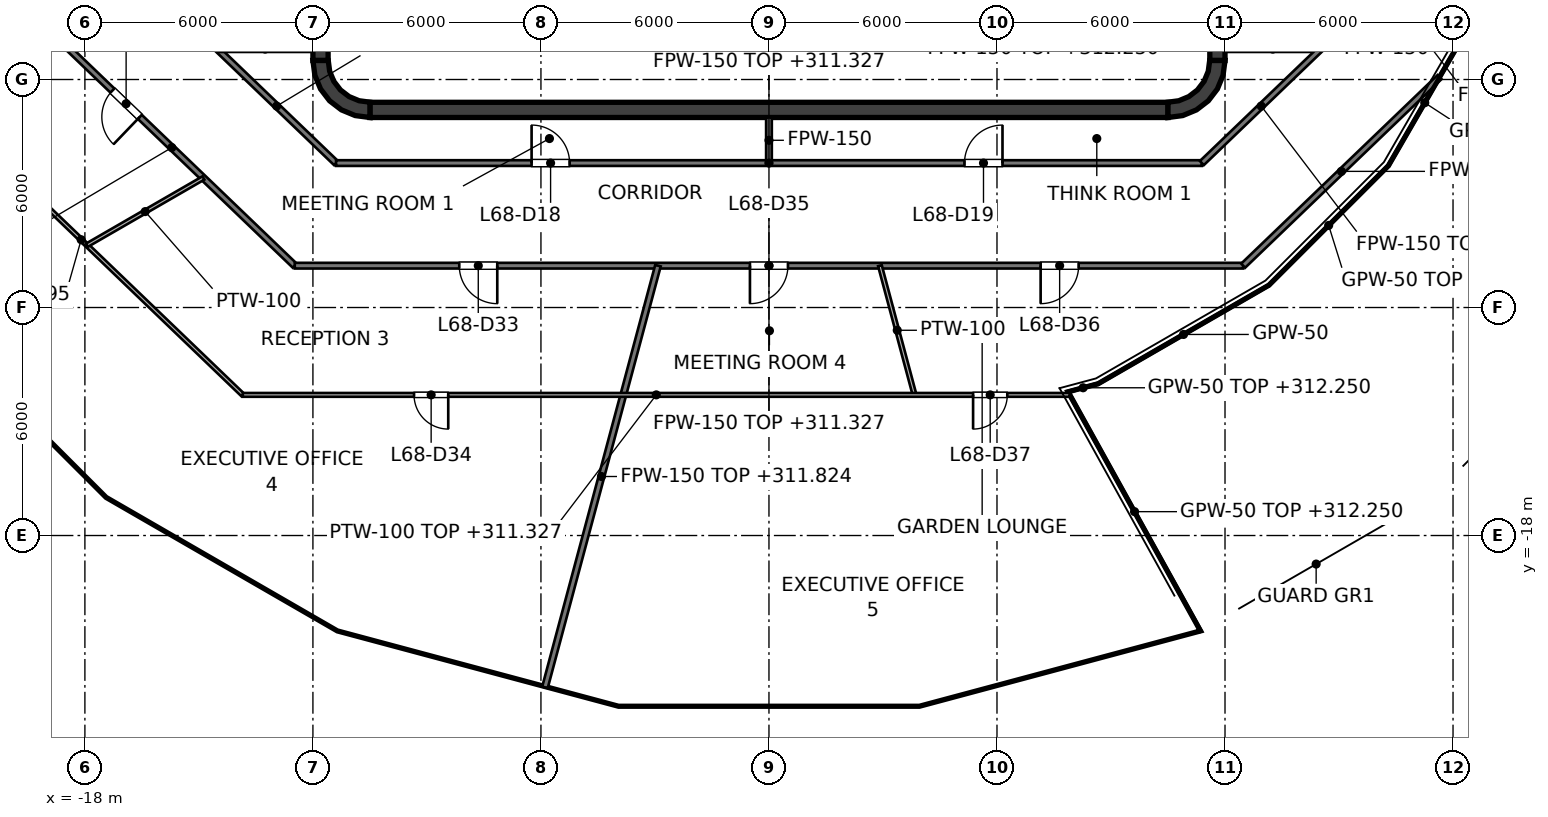
"""IFC4 building model, lengths in metres.
Left out: names, types, materials, properties, quantities, classifications, styles, units other than length and angle.
Written with IfcOpenShell. Run it as: python <this file> out.ifc"""

import sys

from ifc_helpers import new_model, si_unit, direction, frame, frame_2d, origin, place, context, subcontext, project, spatial, polyline, rectangle, outline, extrude, element, fill, save


model = new_model("IFC4")
c1 = context("Model", 3, precision=1e-05, world=origin(), true_north=direction((0.0, 1.0)))
c2 = subcontext(c1, "Body", "Model", "MODEL_VIEW")
j1 = project(units=[si_unit("LENGTHUNIT", "METRE"), si_unit("PLANEANGLEUNIT", "RADIAN")], contexts=[c1])
p1 = place(None, origin())
s1 = spatial("IfcSite", under=j1, at=p1, CompositionType="ELEMENT")
p2 = place(p1, origin())
s2 = spatial("IfcBuilding", under=s1, at=p2, CompositionType="ELEMENT")
p3 = place(p2, frame((0.0, 0.0, 308.4)))
s3 = spatial("IfcBuildingStorey", under=s2, at=p3, CompositionType="ELEMENT", Elevation=308.4)
p4 = place(p3, frame((-10.5, -6.8, 0.0), z_axis=(0.0, 0.0, 1.0), x_axis=(1.0, 0.0, 0.0)))
e1 = element("IfcWall", 1, at=p4, inside=s3, PredefinedType="SHEAR", context=c2, shape_type="SweptSolid", body=[
    extrude(rectangle(XDim=21.0, YDim=0.4, at=frame_2d((10.5, 0.0))), origin(), (0.0, 0.0, 1.0), 4.0),
])
p5 = place(p3, frame((11.8, -5.5, 0.0), z_axis=(0.0, 0.0, 1.0), x_axis=(0.0, 1.0, 0.0)))
e2 = element("IfcWall", 2, at=p5, inside=s3, PredefinedType="SHEAR", context=c2, shape_type="SweptSolid", body=[
    extrude(rectangle(XDim=11.0, YDim=0.4, at=frame_2d((5.5, 0.0))), origin(), (0.0, 0.0, 1.0), 4.0),
])
p6 = place(p5, frame((3.2, 0.0, 0.0)))
e3 = element("IfcOpeningElement", 3, at=p6, cuts=e2, PredefinedType="OPENING", context=c2, shape_type="SweptSolid", body=[
    extrude(rectangle(XDim=1.0, YDim=2.1, at=frame_2d((0.5, 1.05))), frame((0.0, 0.2, 0.0), z_axis=(0.0, -1.0, 0.0), x_axis=(1.0, 0.0, 0.0)), (0.0, 0.0, 1.0), 0.4),
])
p7 = place(p5, frame((6.1, 0.0, 0.0)))
e4 = element("IfcOpeningElement", 4, at=p7, cuts=e2, PredefinedType="OPENING", context=c2, shape_type="SweptSolid", body=[
    extrude(rectangle(XDim=1.0, YDim=2.1, at=frame_2d((0.5, 1.05))), frame((0.0, 0.2, 0.0), z_axis=(0.0, -1.0, 0.0), x_axis=(1.0, 0.0, 0.0)), (0.0, 0.0, 1.0), 0.4),
])
p8 = place(p5, frame((0.9, 0.0, 0.0)))
e5 = element("IfcOpeningElement", 5, at=p8, cuts=e2, PredefinedType="OPENING", context=c2, shape_type="SweptSolid", body=[
    extrude(rectangle(XDim=1.2, YDim=2.1, at=frame_2d((0.6, 1.05))), frame((0.0, 0.2, 0.0), z_axis=(0.0, -1.0, 0.0), x_axis=(1.0, 0.0, 0.0)), (0.0, 0.0, 1.0), 0.4),
])
p9 = place(p5, frame((8.9, 0.0, 0.0)))
e6 = element("IfcOpeningElement", 6, at=p9, cuts=e2, PredefinedType="OPENING", context=c2, shape_type="SweptSolid", body=[
    extrude(rectangle(XDim=1.2, YDim=2.1, at=frame_2d((0.6, 1.05))), frame((0.0, 0.2, 0.0), z_axis=(0.0, -1.0, 0.0), x_axis=(1.0, 0.0, 0.0)), (0.0, 0.0, 1.0), 0.4),
])
p10 = place(p3, frame((-11.8, -5.5, 0.0), z_axis=(0.0, 0.0, 1.0), x_axis=(0.0, 1.0, 0.0)))
e7 = element("IfcWall", 7, at=p10, inside=s3, PredefinedType="SHEAR", context=c2, shape_type="SweptSolid", body=[
    extrude(rectangle(XDim=11.0, YDim=0.4, at=frame_2d((5.5, 0.0))), origin(), (0.0, 0.0, 1.0), 4.0),
])
p11 = place(p10, frame((3.8, 0.0, 0.0)))
e8 = element("IfcOpeningElement", 8, at=p11, cuts=e7, PredefinedType="OPENING", context=c2, shape_type="SweptSolid", body=[
    extrude(rectangle(XDim=1.0, YDim=2.1, at=frame_2d((0.5, 1.05))), frame((0.0, 0.2, 0.0), z_axis=(0.0, -1.0, 0.0), x_axis=(1.0, 0.0, 0.0)), (0.0, 0.0, 1.0), 0.4),
])
p12 = place(p10, frame((6.7, 0.0, 0.0)))
e9 = element("IfcOpeningElement", 9, at=p12, cuts=e7, PredefinedType="OPENING", context=c2, shape_type="SweptSolid", body=[
    extrude(rectangle(XDim=1.0, YDim=2.1, at=frame_2d((0.5, 1.05))), frame((0.0, 0.2, 0.0), z_axis=(0.0, -1.0, 0.0), x_axis=(1.0, 0.0, 0.0)), (0.0, 0.0, 1.0), 0.4),
])
p13 = place(p10, frame((0.9, 0.0, 0.0)))
e10 = element("IfcOpeningElement", 10, at=p13, cuts=e7, PredefinedType="OPENING", context=c2, shape_type="SweptSolid", body=[
    extrude(rectangle(XDim=1.2, YDim=2.1, at=frame_2d((0.6, 1.05))), frame((0.0, 0.2, 0.0), z_axis=(0.0, -1.0, 0.0), x_axis=(1.0, 0.0, 0.0)), (0.0, 0.0, 1.0), 0.4),
])
p14 = place(p10, frame((8.9, 0.0, 0.0)))
e11 = element("IfcOpeningElement", 11, at=p14, cuts=e7, PredefinedType="OPENING", context=c2, shape_type="SweptSolid", body=[
    extrude(rectangle(XDim=1.2, YDim=2.1, at=frame_2d((0.6, 1.05))), frame((0.0, 0.2, 0.0), z_axis=(0.0, -1.0, 0.0), x_axis=(1.0, 0.0, 0.0)), (0.0, 0.0, 1.0), 0.4),
])
p15 = place(p3, origin())
e12 = element("IfcWall", 12, at=p15, inside=s3, PredefinedType="SHEAR", context=c2, shape_type="SweptSolid", body=[
    extrude(outline(polyline([(-10.5, -7.0), (-10.5, -6.596), (-10.784, -6.559), (-11.048, -6.45), (-11.275, -6.275), (-11.45, -6.048), (-11.559, -5.784), (-11.596, -5.5), (-12.0, -5.5), (-11.949, -5.888), (-11.799, -6.25), (-11.561, -6.561), (-11.25, -6.799), (-10.888, -6.949), (-10.5, -7.0)])), origin(), (0.0, 0.0, 1.0), 4.0),
])
e13 = element("IfcWall", 13, at=p15, inside=s3, PredefinedType="SHEAR", context=c2, shape_type="SweptSolid", body=[
    extrude(outline(polyline([(12.0, -5.5), (11.596, -5.5), (11.559, -5.784), (11.45, -6.048), (11.275, -6.275), (11.048, -6.45), (10.784, -6.559), (10.5, -6.596), (10.5, -7.0), (10.888, -6.949), (11.25, -6.799), (11.561, -6.561), (11.799, -6.25), (11.949, -5.888), (12.0, -5.5)])), origin(), (0.0, 0.0, 1.0), 4.0),
])
p16 = place(p3, frame((-1.2, -6.6, 0.0), z_axis=(0.0, 0.0, 1.0), x_axis=(0.0, 1.0, 0.0)))
e14 = element("IfcWall", 14, at=p16, inside=s3, PredefinedType="PARTITIONING", context=c2, shape_type="SweptSolid", body=[
    extrude(rectangle(XDim=2.5, YDim=0.15, at=frame_2d((1.25, 0.0))), origin(), (0.0, 0.0, 1.0), 3.85),
])
p17 = place(p16, frame((0.8, 0.0, 0.0)))
e15 = element("IfcOpeningElement", 15, at=p17, cuts=e14, PredefinedType="OPENING", context=c2, shape_type="SweptSolid", body=[
    extrude(rectangle(XDim=0.9, YDim=2.1, at=frame_2d((0.45, 1.05))), frame((0.0, 0.075, 0.0), z_axis=(0.0, -1.0, 0.0), x_axis=(1.0, 0.0, 0.0)), (0.0, 0.0, 1.0), 0.15),
])
p18 = place(p3, frame((9.0, -6.6, 0.0), z_axis=(0.0, 0.0, 1.0), x_axis=(0.0, 1.0, 0.0)))
e16 = element("IfcWall", 16, at=p18, inside=s3, PredefinedType="SOLIDWALL", context=c2, shape_type="SweptSolid", body=[
    extrude(rectangle(XDim=2.5, YDim=0.25, at=frame_2d((1.25, 0.0))), origin(), (0.0, 0.0, 1.0), 3.85),
])
p19 = place(p18, frame((0.65, 0.0, 0.0)))
e17 = element("IfcOpeningElement", 17, at=p19, cuts=e16, PredefinedType="OPENING", context=c2, shape_type="SweptSolid", body=[
    extrude(rectangle(XDim=1.2, YDim=2.1, at=frame_2d((0.6, 1.05))), frame((0.0, 0.125, 0.0), z_axis=(0.0, -1.0, 0.0), x_axis=(1.0, 0.0, 0.0)), (0.0, 0.0, 1.0), 0.25),
])
p20 = place(p3, frame((-9.0, -6.6, 0.0), z_axis=(0.0, 0.0, 1.0), x_axis=(0.0, 1.0, 0.0)))
e18 = element("IfcWall", 18, at=p20, inside=s3, PredefinedType="PARTITIONING", context=c2, shape_type="SweptSolid", body=[
    extrude(rectangle(XDim=2.5, YDim=0.25, at=frame_2d((1.25, 0.0))), origin(), (0.0, 0.0, 1.0), 3.85),
])
p21 = place(p20, frame((0.75, 0.0, 0.0)))
e19 = element("IfcOpeningElement", 19, at=p21, cuts=e18, PredefinedType="OPENING", context=c2, shape_type="SweptSolid", body=[
    extrude(rectangle(XDim=1.0, YDim=2.1, at=frame_2d((0.5, 1.05))), frame((0.0, 0.125, 0.0), z_axis=(0.0, -1.0, 0.0), x_axis=(1.0, 0.0, 0.0)), (0.0, 0.0, 1.0), 0.25),
])
p22 = place(p3, frame((3.15, -6.6, 0.0), z_axis=(0.0, 0.0, 1.0), x_axis=(0.0, 1.0, 0.0)))
e20 = element("IfcWall", 20, at=p22, inside=s3, PredefinedType="SOLIDWALL", context=c2, shape_type="SweptSolid", body=[
    extrude(rectangle(XDim=2.5, YDim=0.25, at=frame_2d((1.25, 0.0))), origin(), (0.0, 0.0, 1.0), 3.85),
])
p23 = place(p3, frame((-2.9, -6.6, 0.0), z_axis=(0.0, 0.0, 1.0), x_axis=(0.0, 1.0, 0.0)))
e21 = element("IfcWall", 21, at=p23, inside=s3, PredefinedType="PARTITIONING", context=c2, shape_type="SweptSolid", body=[
    extrude(rectangle(XDim=2.5, YDim=0.25, at=frame_2d((1.25, 0.0))), origin(), (0.0, 0.0, 1.0), 3.85),
])
p24 = place(p23, frame((0.8, 0.0, 0.0)))
e22 = element("IfcOpeningElement", 22, at=p24, cuts=e21, PredefinedType="OPENING", context=c2, shape_type="SweptSolid", body=[
    extrude(rectangle(XDim=0.9, YDim=2.1, at=frame_2d((0.45, 1.05))), frame((0.0, 0.125, 0.0), z_axis=(0.0, -1.0, 0.0), x_axis=(1.0, 0.0, 0.0)), (0.0, 0.0, 1.0), 0.25),
])
p25 = place(p3, frame((-18.95, -4.683, 0.0), z_axis=(0.0, 0.0, 1.0), x_axis=(0.721259541977, -0.692664906797, 0.0)))
e23 = element("IfcWall", 23, at=p25, inside=s3, PredefinedType="PARTITIONING", context=c2, shape_type="SweptSolid", body=[
    extrude(rectangle(XDim=8.973, YDim=0.15, at=frame_2d((4.487, 0.0))), origin(), (0.0, 0.0, 1.0), 3.076),
])
p26 = place(p25, frame((2.321, 0.0, 0.0)))
e24 = element("IfcOpeningElement", 24, at=p26, cuts=e23, PredefinedType="OPENING", context=c2, shape_type="SweptSolid", body=[
    extrude(rectangle(XDim=1.0, YDim=2.1, at=frame_2d((0.5, 1.05))), frame((0.0, 0.075, 0.0), z_axis=(0.0, -1.0, 0.0), x_axis=(1.0, 0.0, 0.0)), (0.0, 0.0, 1.0), 0.15),
])
p27 = place(p3, frame((-14.514, -5.2, 0.0), z_axis=(0.0, 0.0, 1.0), x_axis=(0.721228427004, -0.692697304803, 0.0)))
e25 = element("IfcWall", 25, at=p27, inside=s3, PredefinedType="PARTITIONING", context=c2, shape_type="SweptSolid", body=[
    extrude(rectangle(XDim=4.33, YDim=0.15, at=frame_2d((2.165, 0.0))), origin(), (0.0, 0.0, 1.0), 3.076),
])
p28 = place(p3, frame((-12.478, -10.899, 0.0), z_axis=(0.0, 0.0, 1.0), x_axis=(1.0, 0.0, 0.0)))
e26 = element("IfcWall", 26, at=p28, inside=s3, PredefinedType="PARTITIONING", context=c2, shape_type="SweptSolid", body=[
    extrude(rectangle(XDim=24.956, YDim=0.15, at=frame_2d((12.478, 0.0))), origin(), (0.0, 0.0, 1.0), 2.927),
])
p29 = place(p28, frame((4.329, 0.0, 0.0)))
e27 = element("IfcOpeningElement", 27, at=p29, cuts=e26, PredefinedType="OPENING", context=c2, shape_type="SweptSolid", body=[
    extrude(rectangle(XDim=1.0, YDim=2.1, at=frame_2d((0.5, 1.05))), frame((0.0, 0.075, 0.0), z_axis=(0.0, -1.0, 0.0), x_axis=(1.0, 0.0, 0.0)), (0.0, 0.0, 1.0), 0.15),
])
p30 = place(p28, frame((11.978, 0.0, 0.0)))
e28 = element("IfcOpeningElement", 28, at=p30, cuts=e26, PredefinedType="OPENING", context=c2, shape_type="SweptSolid", body=[
    extrude(rectangle(XDim=1.0, YDim=2.1, at=frame_2d((0.5, 1.05))), frame((0.0, 0.075, 0.0), z_axis=(0.0, -1.0, 0.0), x_axis=(1.0, 0.0, 0.0)), (0.0, 0.0, 1.0), 0.15),
])
p31 = place(p28, frame((19.627, 0.0, 0.0)))
e29 = element("IfcOpeningElement", 29, at=p31, cuts=e26, PredefinedType="OPENING", context=c2, shape_type="SweptSolid", body=[
    extrude(rectangle(XDim=1.0, YDim=2.1, at=frame_2d((0.5, 1.05))), frame((0.0, 0.075, 0.0), z_axis=(0.0, -1.0, 0.0), x_axis=(1.0, 0.0, 0.0)), (0.0, 0.0, 1.0), 0.15),
])
p32 = place(p3, frame((-11.391, -8.199, 0.0), z_axis=(0.0, 0.0, 1.0), x_axis=(1.0, 0.0, 0.0)))
e30 = element("IfcWall", 30, at=p32, inside=s3, PredefinedType="PARTITIONING", context=c2, shape_type="SweptSolid", body=[
    extrude(rectangle(XDim=22.782, YDim=0.15, at=frame_2d((11.391, 0.0))), origin(), (0.0, 0.0, 1.0), 2.927),
])
p33 = place(p32, frame((5.145, 0.0, 0.0)))
e31 = element("IfcOpeningElement", 31, at=p33, cuts=e30, PredefinedType="OPENING", context=c2, shape_type="SweptSolid", body=[
    extrude(rectangle(XDim=1.0, YDim=2.1, at=frame_2d((0.5, 1.05))), frame((0.0, 0.075, 0.0), z_axis=(0.0, -1.0, 0.0), x_axis=(1.0, 0.0, 0.0)), (0.0, 0.0, 1.0), 0.15),
])
p34 = place(p32, frame((16.536, 0.0, 0.0)))
e32 = element("IfcOpeningElement", 32, at=p34, cuts=e30, PredefinedType="OPENING", context=c2, shape_type="SweptSolid", body=[
    extrude(rectangle(XDim=1.0, YDim=2.1, at=frame_2d((0.5, 1.05))), frame((0.0, 0.075, 0.0), z_axis=(0.0, -1.0, 0.0), x_axis=(1.0, 0.0, 0.0)), (0.0, 0.0, 1.0), 0.15),
])
p35 = place(p3, frame((12.478, -10.899, 0.0), z_axis=(0.0, 0.0, 1.0), x_axis=(0.721272918752, 0.692650977531, 0.0)))
e33 = element("IfcWall", 33, at=p35, inside=s3, PredefinedType="PARTITIONING", context=c2, shape_type="SweptSolid", body=[
    extrude(rectangle(XDim=7.165, YDim=0.15, at=frame_2d((3.583, 0.0))), origin(), (0.0, 0.0, 1.0), 3.076),
])
p36 = place(p3, frame((11.391, -8.199, 0.0), z_axis=(0.0, 0.0, 1.0), x_axis=(0.721256597366, 0.692667972954, 0.0)))
e34 = element("IfcWall", 34, at=p36, inside=s3, PredefinedType="PARTITIONING", context=c2, shape_type="SweptSolid", body=[
    extrude(rectangle(XDim=4.33, YDim=0.15, at=frame_2d((2.165, 0.0))), origin(), (0.0, 0.0, 1.0), 3.076),
])
p37 = place(p3, frame((-5.894, -21.995, 0.0), z_axis=(0.0, 0.0, 1.0), x_axis=(0.25881327894, 0.965927371309, 0.0)))
e35 = element("IfcWall", 35, at=p37, inside=s3, PredefinedType="PARTITIONING", context=c2, shape_type="SweptSolid", body=[
    extrude(rectangle(XDim=11.488, YDim=0.15, at=frame_2d((5.744, 0.0))), origin(), (0.0, 0.0, 1.0), 3.424),
])
p38 = place(p3, frame((0.0, -8.199, 0.0), z_axis=(0.0, 0.0, 1.0), x_axis=(0.0, 1.0, 0.0)))
e36 = element("IfcWall", 36, at=p38, inside=s3, PredefinedType="PARTITIONING", context=c2, shape_type="SweptSolid", body=[
    extrude(rectangle(XDim=1.199, YDim=0.15, at=frame_2d((0.6, 0.0))), origin(), (0.0, 0.0, 1.0), 2.995),
])
p39 = place(p3, frame((7.871, -14.218, 0.0), z_axis=(0.0, 0.0, 1.0), x_axis=(0.484932931807, -0.874551343061, 0.0)))
e37 = element("IfcWall", 37, at=p39, inside=s3, PredefinedType="PARTITIONING", context=c2, shape_type="SweptSolid", body=[
    extrude(rectangle(XDim=7.213, YDim=0.05, at=frame_2d((3.606, 0.0))), origin(), (0.0, 0.0, 1.0), 3.85),
])
p40 = place(p3, frame((7.871, -14.218, 0.0), z_axis=(0.0, 0.0, 1.0), x_axis=(0.965937406396, 0.258775823689, 0.0)))
e38 = element("IfcWall", 38, at=p40, inside=s3, PredefinedType="PARTITIONING", context=c2, shape_type="SweptSolid", body=[
    extrude(rectangle(XDim=0.819, YDim=0.05, at=frame_2d((0.409, 0.0))), origin(), (0.0, 0.0, 1.0), 3.85),
])
p41 = place(p3, frame((8.662, -14.006, 0.0), z_axis=(0.0, 0.0, 1.0), x_axis=(0.86602493519, 0.500000811628, 0.0)))
e39 = element("IfcWall", 39, at=p41, inside=s3, PredefinedType="PARTITIONING", context=c2, shape_type="SweptSolid", body=[
    extrude(rectangle(XDim=5.188, YDim=0.05, at=frame_2d((2.594, 0.0))), origin(), (0.0, 0.0, 1.0), 2.995),
])
p42 = place(p3, frame((13.155, -11.412, 0.0), z_axis=(0.0, 0.0, 1.0), x_axis=(0.707106781187, 0.707106781187, 0.0)))
e40 = element("IfcWall", 40, at=p42, inside=s3, PredefinedType="PARTITIONING", context=c2, shape_type="SweptSolid", body=[
    extrude(rectangle(XDim=4.448, YDim=0.05, at=frame_2d((2.224, 0.0))), origin(), (0.0, 0.0, 1.0), 3.076),
])
p43 = place(p3, frame((16.3, -8.267, 0.0), z_axis=(0.0, 0.0, 1.0), x_axis=(0.500019073792, 0.866014391245, 0.0)))
e41 = element("IfcWall", 41, at=p43, inside=s3, PredefinedType="PARTITIONING", context=c2, shape_type="SweptSolid", body=[
    extrude(rectangle(XDim=3.823, YDim=0.05, at=frame_2d((1.912, 0.0))), origin(), (0.0, 0.0, 1.0), 3.076),
])
p44 = place(p3, frame((2.92, -10.899, 0.0), z_axis=(0.0, 0.0, 1.0), x_axis=(0.258836620112, -0.965921116908, 0.0)))
e42 = element("IfcWall", 42, at=p44, inside=s3, PredefinedType="PARTITIONING", context=c2, shape_type="SweptSolid", body=[
    extrude(rectangle(XDim=3.52, YDim=0.1, at=frame_2d((1.76, 0.0))), origin(), (0.0, 0.0, 1.0), 3.85),
])
p45 = place(p3, frame((-22.35, -6.132, 0.0), z_axis=(0.0, 0.0, 1.0), x_axis=(0.72117874289, -0.692749031615, 0.0)))
e43 = element("IfcWall", 43, at=p45, inside=s3, PredefinedType="PARTITIONING", context=c2, shape_type="SweptSolid", body=[
    extrude(rectangle(XDim=11.791, YDim=0.1, at=frame_2d((5.896, 0.0))), origin(), (0.0, 0.0, 1.0), 2.995),
])
p46 = place(p3, frame((-13.846, -14.299, 0.0), z_axis=(0.0, 0.0, 1.0), x_axis=(1.0, 0.0, 0.0)))
e44 = element("IfcWall", 44, at=p46, inside=s3, PredefinedType="PARTITIONING", context=c2, shape_type="SweptSolid", body=[
    extrude(rectangle(XDim=21.762, YDim=0.1, at=frame_2d((10.881, 0.0))), origin(), (0.0, 0.0, 1.0), 2.927),
])
p47 = place(p46, frame((4.507, 0.0, 0.0)))
e45 = element("IfcOpeningElement", 45, at=p47, cuts=e44, PredefinedType="OPENING", context=c2, shape_type="SweptSolid", body=[
    extrude(rectangle(XDim=0.9, YDim=2.1, at=frame_2d((0.45, 1.05))), frame((0.0, 0.05, 0.0), z_axis=(0.0, -1.0, 0.0), x_axis=(1.0, 0.0, 0.0)), (0.0, 0.0, 1.0), 0.1),
])
p48 = place(p46, frame((19.217, 0.0, 0.0)))
e46 = element("IfcOpeningElement", 46, at=p48, cuts=e44, PredefinedType="OPENING", context=c2, shape_type="SweptSolid", body=[
    extrude(rectangle(XDim=0.9, YDim=2.1, at=frame_2d((0.45, 1.05))), frame((0.0, 0.05, 0.0), z_axis=(0.0, -1.0, 0.0), x_axis=(1.0, 0.0, 0.0)), (0.0, 0.0, 1.0), 0.1),
])
p49 = place(p3, frame((-17.946, -10.361, 0.0), z_axis=(0.0, 0.0, 1.0), x_axis=(0.865967311171, 0.500100605862, 0.0)))
e47 = element("IfcWall", 47, at=p49, inside=s3, PredefinedType="PARTITIONING", context=c2, shape_type="SweptSolid", body=[
    extrude(rectangle(XDim=3.539, YDim=0.1, at=frame_2d((1.77, 0.0))), origin(), (0.0, 0.0, 1.0), 3.85),
])
p50 = place(p19, origin())
e48 = element("IfcDoor", 48, at=p50, inside=s3, OperationType="SINGLE_SWING_LEFT", PredefinedType="DOOR", context=c2, shape_type="SweptSolid", body=[
    extrude(rectangle(XDim=1.2, YDim=2.1, at=frame_2d((0.6, 1.05))), frame((0.0, 0.025, 0.0), z_axis=(0.0, -1.0, 0.0), x_axis=(1.0, 0.0, 0.0)), (0.0, 0.0, 1.0), 0.05),
])
fill(e17, e48)
p51 = place(p21, origin())
e49 = element("IfcDoor", 49, at=p51, inside=s3, OperationType="SINGLE_SWING_LEFT", PredefinedType="DOOR", context=c2, shape_type="SweptSolid", body=[
    extrude(rectangle(XDim=1.0, YDim=2.1, at=frame_2d((0.5, 1.05))), frame((0.0, 0.025, 0.0), z_axis=(0.0, -1.0, 0.0), x_axis=(1.0, 0.0, 0.0)), (0.0, 0.0, 1.0), 0.05),
])
fill(e19, e49)
p52 = place(p24, origin())
e50 = element("IfcDoor", 50, at=p52, inside=s3, OperationType="SINGLE_SWING_RIGHT", PredefinedType="DOOR", context=c2, shape_type="SweptSolid", body=[
    extrude(rectangle(XDim=0.9, YDim=2.1, at=frame_2d((0.45, 1.05))), frame((0.0, 0.025, 0.0), z_axis=(0.0, -1.0, 0.0), x_axis=(1.0, 0.0, 0.0)), (0.0, 0.0, 1.0), 0.05),
])
fill(e22, e50)
p53 = place(p17, origin())
e51 = element("IfcDoor", 51, at=p53, inside=s3, OperationType="SINGLE_SWING_RIGHT", PredefinedType="DOOR", context=c2, shape_type="SweptSolid", body=[
    extrude(rectangle(XDim=0.9, YDim=2.1, at=frame_2d((0.45, 1.05))), frame((0.0, 0.025, 0.0), z_axis=(0.0, -1.0, 0.0), x_axis=(1.0, 0.0, 0.0)), (0.0, 0.0, 1.0), 0.05),
])
fill(e15, e51)
p54 = place(p33, origin())
e52 = element("IfcDoor", 52, at=p54, inside=s3, OperationType="SINGLE_SWING_LEFT", PredefinedType="DOOR", context=c2, shape_type="SweptSolid", body=[
    extrude(rectangle(XDim=1.0, YDim=2.1, at=frame_2d((0.5, 1.05))), frame((0.0, 0.025, 0.0), z_axis=(0.0, -1.0, 0.0), x_axis=(1.0, 0.0, 0.0)), (0.0, 0.0, 1.0), 0.05),
])
fill(e31, e52)
p55 = place(p34, origin())
e53 = element("IfcDoor", 53, at=p55, inside=s3, OperationType="SINGLE_SWING_RIGHT", PredefinedType="DOOR", context=c2, shape_type="SweptSolid", body=[
    extrude(rectangle(XDim=1.0, YDim=2.1, at=frame_2d((0.5, 1.05))), frame((0.0, 0.025, 0.0), z_axis=(0.0, -1.0, 0.0), x_axis=(1.0, 0.0, 0.0)), (0.0, 0.0, 1.0), 0.05),
])
fill(e32, e53)
p56 = place(p26, origin())
e54 = element("IfcDoor", 54, at=p56, inside=s3, OperationType="SINGLE_SWING_RIGHT", PredefinedType="DOOR", context=c2, shape_type="SweptSolid", body=[
    extrude(rectangle(XDim=1.0, YDim=2.1, at=frame_2d((0.5, 1.05))), frame((0.0, 0.025, 0.0), z_axis=(0.0, -1.0, 0.0), x_axis=(1.0, 0.0, 0.0)), (0.0, 0.0, 1.0), 0.05),
])
fill(e24, e54)
p57 = place(p29, origin())
e55 = element("IfcDoor", 55, at=p57, inside=s3, OperationType="SINGLE_SWING_RIGHT", PredefinedType="DOOR", context=c2, shape_type="SweptSolid", body=[
    extrude(rectangle(XDim=1.0, YDim=2.1, at=frame_2d((0.5, 1.05))), frame((0.0, 0.025, 0.0), z_axis=(0.0, -1.0, 0.0), x_axis=(1.0, 0.0, 0.0)), (0.0, 0.0, 1.0), 0.05),
])
fill(e27, e55)
p58 = place(p47, origin())
e56 = element("IfcDoor", 56, at=p58, inside=s3, OperationType="SINGLE_SWING_RIGHT", PredefinedType="DOOR", context=c2, shape_type="SweptSolid", body=[
    extrude(rectangle(XDim=0.9, YDim=2.1, at=frame_2d((0.45, 1.05))), frame((0.0, 0.025, 0.0), z_axis=(0.0, -1.0, 0.0), x_axis=(1.0, 0.0, 0.0)), (0.0, 0.0, 1.0), 0.05),
])
fill(e45, e56)
p59 = place(p30, origin())
e57 = element("IfcDoor", 57, at=p59, inside=s3, OperationType="SINGLE_SWING_LEFT", PredefinedType="DOOR", context=c2, shape_type="SweptSolid", body=[
    extrude(rectangle(XDim=1.0, YDim=2.1, at=frame_2d((0.5, 1.05))), frame((0.0, 0.025, 0.0), z_axis=(0.0, -1.0, 0.0), x_axis=(1.0, 0.0, 0.0)), (0.0, 0.0, 1.0), 0.05),
])
fill(e28, e57)
p60 = place(p31, origin())
e58 = element("IfcDoor", 58, at=p60, inside=s3, OperationType="SINGLE_SWING_LEFT", PredefinedType="DOOR", context=c2, shape_type="SweptSolid", body=[
    extrude(rectangle(XDim=1.0, YDim=2.1, at=frame_2d((0.5, 1.05))), frame((0.0, 0.025, 0.0), z_axis=(0.0, -1.0, 0.0), x_axis=(1.0, 0.0, 0.0)), (0.0, 0.0, 1.0), 0.05),
])
fill(e29, e58)
p61 = place(p48, origin())
e59 = element("IfcDoor", 59, at=p61, inside=s3, OperationType="SINGLE_SWING_LEFT", PredefinedType="DOOR", context=c2, shape_type="SweptSolid", body=[
    extrude(rectangle(XDim=0.9, YDim=2.1, at=frame_2d((0.45, 1.05))), frame((0.0, 0.025, 0.0), z_axis=(0.0, -1.0, 0.0), x_axis=(1.0, 0.0, 0.0)), (0.0, 0.0, 1.0), 0.05),
])
fill(e46, e59)
save(model, sys.argv[1])
